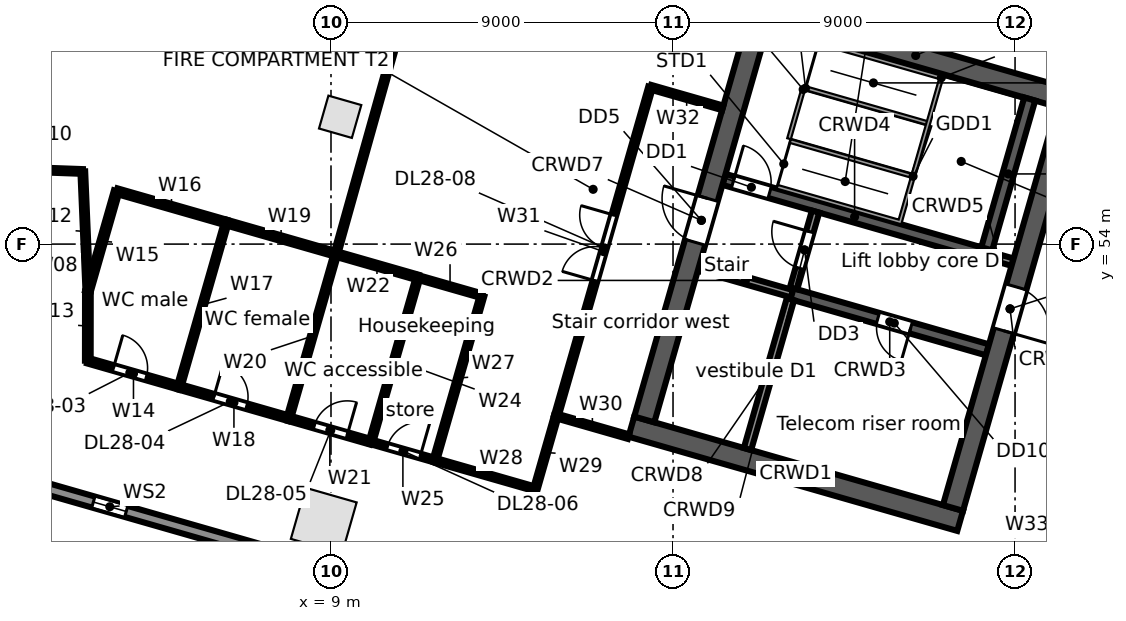
"""IFC4 building model, lengths in metres.
Left out: names, types, materials, properties, quantities, classifications, styles, units other than length and angle.
Written with IfcOpenShell. Run it as: python <this file> out.ifc"""

import sys

from ifc_helpers import new_model, si_unit, direction, frame, frame_2d, origin, origin_2d, place, context, subcontext, project, spatial, rectangle, extrude, element, fill, save


model = new_model("IFC4")
c1 = context("Model", 3, precision=1e-05, world=origin(), true_north=direction((0.0, 1.0)))
c2 = subcontext(c1, "Body", "Model", "MODEL_VIEW")
j1 = project(units=[si_unit("LENGTHUNIT", "METRE"), si_unit("PLANEANGLEUNIT", "RADIAN")], contexts=[c1])
p1 = place(None, origin())
s1 = spatial("IfcSite", under=j1, at=p1, CompositionType="ELEMENT")
p2 = place(p1, origin())
s2 = spatial("IfcBuilding", under=s1, at=p2, CompositionType="ELEMENT")
p3 = place(p2, frame((0.0, 0.0, 136.7)))
s3 = spatial("IfcBuildingStorey", under=s2, at=p3, CompositionType="ELEMENT", Elevation=136.7)
p4 = place(p3, frame((8.81, 46.722, 0.0), z_axis=(0.0, 0.0, 1.0), x_axis=(0.961261695938, -0.275637355817, 0.0)))
e1 = element("IfcColumn", 1, at=p4, inside=s3, PredefinedType="COLUMN", context=c2, shape_type="SweptSolid", body=[
    extrude(rectangle(XDim=1.4, YDim=1.4, at=origin_2d()), origin(), (0.0, 0.0, 1.0), 4.4),
])
p5 = place(p3, frame((9.241, 57.35, 0.0), z_axis=(0.0, 0.0, 1.0), x_axis=(0.961261695938, -0.275637355817, 0.0)))
e2 = element("IfcColumn", 2, at=p5, inside=s3, PredefinedType="COLUMN", context=c2, shape_type="SweptSolid", body=[
    extrude(rectangle(XDim=0.9, YDim=0.9, at=origin_2d()), origin(), (0.0, 0.0, 1.0), 4.4),
])
p6 = place(p3, frame((25.398, 40.717, 0.0), z_axis=(0.0, 0.0, 1.0), x_axis=(-0.961262423262, 0.275634819324, 0.0)))
e3 = element("IfcWall", 3, at=p6, inside=s3, PredefinedType="STANDARD", context=c2, shape_type="SweptSolid", body=[
    extrude(rectangle(XDim=26.359, YDim=0.3, at=frame_2d((13.179, 0.0))), origin(), (0.0, 0.0, 1.0), 4.08),
])
p7 = place(p6, frame((22.664, 0.0, 0.6)))
e4 = element("IfcOpeningElement", 4, at=p7, cuts=e3, PredefinedType="OPENING", context=c2, shape_type="SweptSolid", body=[
    extrude(rectangle(XDim=0.9, YDim=2.8, at=frame_2d((0.45, 1.4))), frame((0.0, 0.16, 0.0), z_axis=(0.0, -1.0, 0.0), x_axis=(1.0, 0.0, 0.0)), (0.0, 0.0, 1.0), 0.32),
])
p8 = place(p6, frame((13.844, 0.0, 0.6)))
e5 = element("IfcOpeningElement", 5, at=p8, cuts=e3, PredefinedType="OPENING", context=c2, shape_type="SweptSolid", body=[
    extrude(rectangle(XDim=0.9, YDim=2.8, at=frame_2d((0.45, 1.4))), frame((0.0, 0.16, 0.0), z_axis=(0.0, -1.0, 0.0), x_axis=(1.0, 0.0, 0.0)), (0.0, 0.0, 1.0), 0.32),
])
p9 = place(p6, frame((5.023, 0.0, 0.6)))
e6 = element("IfcOpeningElement", 6, at=p9, cuts=e3, PredefinedType="OPENING", context=c2, shape_type="SweptSolid", body=[
    extrude(rectangle(XDim=0.9, YDim=2.8, at=frame_2d((0.45, 1.4))), frame((0.0, 0.16, 0.0), z_axis=(0.0, -1.0, 0.0), x_axis=(1.0, 0.0, 0.0)), (0.0, 0.0, 1.0), 0.32),
])
p10 = place(p3, frame((16.904, 49.197, 0.0), z_axis=(0.0, 0.0, 1.0), x_axis=(0.96126248289, -0.275634611374, 0.0)))
e7 = element("IfcWall", 7, at=p10, inside=s3, PredefinedType="SOLIDWALL", context=c2, shape_type="SweptSolid", body=[
    extrude(rectangle(XDim=9.0, YDim=0.55, at=frame_2d((4.5, 0.0))), origin(), (0.0, 0.0, 1.0), 4.08),
])
p11 = place(p3, frame((18.68, 53.396, 0.0), z_axis=(0.0, 0.0, 1.0), x_axis=(0.961234387647, -0.275732573349, 0.0)))
e8 = element("IfcWall", 8, at=p11, inside=s3, PredefinedType="SOLIDWALL", context=c2, shape_type="SweptSolid", body=[
    extrude(rectangle(XDim=2.55, YDim=0.2, at=frame_2d((1.275, 0.0))), origin(), (0.0, 0.0, 1.0), 4.08),
])
p12 = place(p3, frame((21.131, 52.692, 0.0), z_axis=(0.0, 0.0, 1.0), x_axis=(0.961265220997, -0.27562506218, 0.0)))
e9 = element("IfcWall", 9, at=p12, inside=s3, PredefinedType="SOLIDWALL", context=c2, shape_type="SweptSolid", body=[
    extrude(rectangle(XDim=5.35, YDim=0.3, at=frame_2d((2.675, 0.0))), origin(), (0.0, 0.0, 1.0), 4.08),
])
p13 = place(p12, frame((2.35, 0.0, 0.0)))
e10 = element("IfcOpeningElement", 10, at=p13, cuts=e9, PredefinedType="OPENING", context=c2, shape_type="SweptSolid", body=[
    extrude(rectangle(XDim=0.9, YDim=2.1, at=frame_2d((0.45, 1.05))), frame((0.0, 0.16, 0.0), z_axis=(0.0, -1.0, 0.0), x_axis=(1.0, 0.0, 0.0)), (0.0, 0.0, 1.0), 0.32),
])
p14 = place(p3, frame((19.341, 55.702, 0.0), z_axis=(0.0, 0.0, 1.0), x_axis=(0.961263228157, -0.27563201228, 0.0)))
e11 = element("IfcWall", 11, at=p14, inside=s3, PredefinedType="SOLIDWALL", context=c2, shape_type="SweptSolid", body=[
    extrude(rectangle(XDim=7.15, YDim=0.3, at=frame_2d((3.575, 0.0))), origin(), (0.0, 0.0, 1.0), 4.08),
])
p15 = place(p14, frame((0.25, 0.0, 0.0)))
e12 = element("IfcOpeningElement", 12, at=p15, cuts=e11, PredefinedType="OPENING", context=c2, shape_type="SweptSolid", body=[
    extrude(rectangle(XDim=1.0, YDim=2.1, at=frame_2d((0.5, 1.05))), frame((0.0, 0.16, 0.0), z_axis=(0.0, -1.0, 0.0), x_axis=(1.0, 0.0, 0.0)), (0.0, 0.0, 1.0), 0.32),
])
p16 = place(p3, frame((26.214, 53.732, 0.0), z_axis=(0.0, 0.0, 1.0), x_axis=(0.961240918172, -0.275709806194, 0.0)))
e13 = element("IfcWall", 13, at=p16, inside=s3, PredefinedType="SOLIDWALL", context=c2, shape_type="SweptSolid", body=[
    extrude(rectangle(XDim=0.75, YDim=0.2, at=frame_2d((0.375, 0.0))), origin(), (0.0, 0.0, 1.0), 4.08),
])
p17 = place(p3, frame((20.06, 60.204, 0.0), z_axis=(0.0, 0.0, 1.0), x_axis=(0.96126248289, -0.275634611374, 0.0)))
e14 = element("IfcWall", 14, at=p17, inside=s3, PredefinedType="SOLIDWALL", context=c2, shape_type="SweptSolid", body=[
    extrude(rectangle(XDim=9.0, YDim=0.55, at=frame_2d((4.5, 0.0))), origin(), (0.0, 0.0, 1.0), 4.08),
])
p18 = place(p3, frame((17.244, 49.386, 0.0), z_axis=(0.0, 0.0, 1.0), x_axis=(0.275632146085, 0.96126318979, 0.0)))
e15 = element("IfcWall", 15, at=p18, inside=s3, PredefinedType="SOLIDWALL", context=c2, shape_type="SweptSolid", body=[
    extrude(rectangle(XDim=10.9, YDim=0.55, at=frame_2d((5.45, 0.0))), origin(), (0.0, 0.0, 1.0), 4.08),
])
p19 = place(p18, frame((4.85, 0.0, 0.0)))
e16 = element("IfcOpeningElement", 16, at=p19, cuts=e15, PredefinedType="OPENING", context=c2, shape_type="SweptSolid", body=[
    extrude(rectangle(XDim=1.2, YDim=2.1, at=frame_2d((0.6, 1.05))), frame((0.0, 0.285, 0.0), z_axis=(0.0, -1.0, 0.0), x_axis=(1.0, 0.0, 0.0)), (0.0, 0.0, 1.0), 0.57),
])
p20 = place(p3, frame((19.959, 48.607, 0.0), z_axis=(0.0, 0.0, 1.0), x_axis=(0.275641165445, 0.961260603537, 0.0)))
e17 = element("IfcWall", 17, at=p20, inside=s3, PredefinedType="SOLIDWALL", context=c2, shape_type="SweptSolid", body=[
    extrude(rectangle(XDim=4.1, YDim=0.2, at=frame_2d((2.05, 0.0))), origin(), (0.0, 0.0, 1.0), 4.08),
])
p21 = place(p3, frame((21.172, 52.837, 0.0), z_axis=(0.0, 0.0, 1.0), x_axis=(0.275657676022, 0.961255868981, 0.0)))
e18 = element("IfcWall", 18, at=p21, inside=s3, PredefinedType="PARTITIONING", context=c2, shape_type="SweptSolid", body=[
    extrude(rectangle(XDim=2.1, YDim=0.2, at=frame_2d((1.05, 0.0))), origin(), (0.0, 0.0, 1.0), 4.08),
])
p22 = place(p21, frame((0.55, 0.0, 0.0)))
e19 = element("IfcOpeningElement", 19, at=p22, cuts=e18, PredefinedType="OPENING", context=c2, shape_type="SweptSolid", body=[
    extrude(rectangle(XDim=1.0, YDim=2.1, at=frame_2d((0.5, 1.05))), frame((0.0, 0.11, 0.0), z_axis=(0.0, -1.0, 0.0), x_axis=(1.0, 0.0, 0.0)), (0.0, 0.0, 1.0), 0.22),
])
p23 = place(p3, frame((26.256, 53.876, 0.0), z_axis=(0.0, 0.0, 1.0), x_axis=(0.275641165445, 0.961260603537, 0.0)))
e20 = element("IfcWall", 20, at=p23, inside=s3, PredefinedType="SOLIDWALL", context=c2, shape_type="SweptSolid", body=[
    extrude(rectangle(XDim=4.1, YDim=0.3, at=frame_2d((2.05, 0.0))), origin(), (0.0, 0.0, 1.0), 4.08),
])
p24 = place(p3, frame((25.366, 47.057, 0.0), z_axis=(0.0, 0.0, 1.0), x_axis=(0.275632146085, 0.96126318979, 0.0)))
e21 = element("IfcWall", 21, at=p24, inside=s3, PredefinedType="SOLIDWALL", context=c2, shape_type="SweptSolid", body=[
    extrude(rectangle(XDim=10.9, YDim=0.55, at=frame_2d((5.45, 0.0))), origin(), (0.0, 0.0, 1.0), 4.08),
])
p25 = place(p24, frame((4.85, 0.0, 0.0)))
e22 = element("IfcOpeningElement", 22, at=p25, cuts=e21, PredefinedType="OPENING", context=c2, shape_type="SweptSolid", body=[
    extrude(rectangle(XDim=1.2, YDim=2.1, at=frame_2d((0.6, 1.05))), frame((0.0, 0.285, 0.0), z_axis=(0.0, -1.0, 0.0), x_axis=(1.0, 0.0, 0.0)), (0.0, 0.0, 1.0), 0.57),
])
p26 = place(p3, frame((0.0, 56.0, 0.0), z_axis=(0.0, 0.0, 1.0), x_axis=(0.999349313684, -0.036068673934, 0.0)))
e23 = element("IfcWall", 23, at=p26, inside=s3, PredefinedType="PARTITIONING", context=c2, shape_type="SweptSolid", body=[
    extrude(rectangle(XDim=2.471, YDim=0.125, at=frame_2d((1.235, 0.0))), origin(), (0.0, 0.0, 1.0), 4.08),
])
p27 = place(p26, frame((0.7, 0.0, 0.0)))
e24 = element("IfcOpeningElement", 24, at=p27, cuts=e23, PredefinedType="OPENING", context=c2, shape_type="SweptSolid", body=[
    extrude(rectangle(XDim=0.9, YDim=2.1, at=frame_2d((0.45, 1.05))), frame((0.0, 0.073, 0.0), z_axis=(0.0, -1.0, 0.0), x_axis=(1.0, 0.0, 0.0)), (0.0, 0.0, 1.0), 0.145),
])
p28 = place(p3, frame((2.469, 55.911, 0.0), z_axis=(0.0, 0.0, 1.0), x_axis=(0.042391721597, -0.99910106693, 0.0)))
e25 = element("IfcWall", 25, at=p28, inside=s3, PredefinedType="PARTITIONING", context=c2, shape_type="SweptSolid", body=[
    extrude(rectangle(XDim=3.162, YDim=0.125, at=frame_2d((1.581, 0.0))), origin(), (0.0, 0.0, 1.0), 4.08),
])
p29 = place(p3, frame((2.601, 50.932, 0.0), z_axis=(0.0, 0.0, 1.0), x_axis=(0.001073104681, 0.999999424223, 0.0)))
e26 = element("IfcWall", 26, at=p29, inside=s3, PredefinedType="PARTITIONING", context=c2, shape_type="SweptSolid", body=[
    extrude(rectangle(XDim=1.82, YDim=0.15, at=frame_2d((0.91, 0.0))), origin(), (0.0, 0.0, 1.0), 4.08),
])
p30 = place(p3, frame((2.601, 50.932, 0.0), z_axis=(0.0, 0.0, 1.0), x_axis=(0.961265528111, -0.275623991092, 0.0)))
e27 = element("IfcWall", 27, at=p30, inside=s3, PredefinedType="PARTITIONING", context=c2, shape_type="SweptSolid", body=[
    extrude(rectangle(XDim=2.5, YDim=0.15, at=frame_2d((1.25, 0.0))), origin(), (0.0, 0.0, 1.0), 4.08),
])
p31 = place(p30, frame((0.7, 0.0, 0.0)))
e28 = element("IfcOpeningElement", 28, at=p31, cuts=e27, PredefinedType="OPENING", context=c2, shape_type="SweptSolid", body=[
    extrude(rectangle(XDim=0.9, YDim=2.1, at=frame_2d((0.45, 1.05))), frame((0.0, 0.085, 0.0), z_axis=(0.0, -1.0, 0.0), x_axis=(1.0, 0.0, 0.0)), (0.0, 0.0, 1.0), 0.17),
])
p32 = place(p3, frame((2.603, 52.752, 0.0), z_axis=(0.0, 0.0, 1.0), x_axis=(0.27569433145, 0.961245356611, 0.0)))
e29 = element("IfcWall", 29, at=p32, inside=s3, PredefinedType="PARTITIONING", context=c2, shape_type="SweptSolid", body=[
    extrude(rectangle(XDim=2.75, YDim=0.15, at=frame_2d((1.375, 0.0))), origin(), (0.0, 0.0, 1.0), 4.08),
])
p33 = place(p3, frame((3.361, 55.395, 0.0), z_axis=(0.0, 0.0, 1.0), x_axis=(0.961268664977, -0.27561305073, 0.0)))
e30 = element("IfcWall", 30, at=p33, inside=s3, PredefinedType="PARTITIONING", context=c2, shape_type="SweptSolid", body=[
    extrude(rectangle(XDim=3.0, YDim=0.15, at=frame_2d((1.5, 0.0))), origin(), (0.0, 0.0, 1.0), 4.08),
])
p34 = place(p3, frame((5.004, 50.243, 0.0), z_axis=(0.0, 0.0, 1.0), x_axis=(0.275838825927, 0.961203902464, 0.0)))
e31 = element("IfcWall", 31, at=p34, inside=s3, PredefinedType="PARTITIONING", context=c2, shape_type="SweptSolid", body=[
    extrude(rectangle(XDim=4.5, YDim=0.125, at=frame_2d((2.25, 0.0))), origin(), (0.0, 0.0, 1.0), 4.08),
])
p35 = place(p3, frame((5.004, 50.243, 0.0), z_axis=(0.0, 0.0, 1.0), x_axis=(0.961268664977, -0.27561305073, 0.0)))
e32 = element("IfcWall", 32, at=p35, inside=s3, PredefinedType="PARTITIONING", context=c2, shape_type="SweptSolid", body=[
    extrude(rectangle(XDim=3.0, YDim=0.15, at=frame_2d((1.5, 0.0))), origin(), (0.0, 0.0, 1.0), 4.08),
])
p36 = place(p35, frame((0.95, 0.0, 0.0)))
e33 = element("IfcOpeningElement", 33, at=p36, cuts=e32, PredefinedType="OPENING", context=c2, shape_type="SweptSolid", body=[
    extrude(rectangle(XDim=0.9, YDim=2.1, at=frame_2d((0.45, 1.05))), frame((0.0, 0.085, 0.0), z_axis=(0.0, -1.0, 0.0), x_axis=(1.0, 0.0, 0.0)), (0.0, 0.0, 1.0), 0.17),
])
p37 = place(p3, frame((6.245, 54.568, 0.0), z_axis=(0.0, 0.0, 1.0), x_axis=(0.961240918172, -0.275709806194, 0.0)))
e34 = element("IfcWall", 34, at=p37, inside=s3, PredefinedType="PARTITIONING", context=c2, shape_type="SweptSolid", body=[
    extrude(rectangle(XDim=3.0, YDim=0.15, at=frame_2d((1.5, 0.0))), origin(), (0.0, 0.0, 1.0), 3.16),
])
p38 = place(p3, frame((7.888, 49.416, 0.0), z_axis=(0.0, 0.0, 1.0), x_axis=(0.275803080638, 0.96121415965, 0.0)))
e35 = element("IfcWall", 35, at=p38, inside=s3, PredefinedType="PARTITIONING", context=c2, shape_type="SweptSolid", body=[
    extrude(rectangle(XDim=4.5, YDim=0.125, at=frame_2d((2.25, 0.0))), origin(), (0.0, 0.0, 1.0), 3.16),
])
p39 = place(p3, frame((7.888, 49.416, 0.0), z_axis=(0.0, 0.0, 1.0), x_axis=(0.9611628742, -0.275981755301, 0.0)))
e36 = element("IfcWall", 36, at=p39, inside=s3, PredefinedType="PARTITIONING", context=c2, shape_type="SweptSolid", body=[
    extrude(rectangle(XDim=2.25, YDim=0.15, at=frame_2d((1.125, 0.0))), origin(), (0.0, 0.0, 1.0), 3.142),
])
p40 = place(p39, frame((0.7, 0.0, 0.0)))
e37 = element("IfcOpeningElement", 37, at=p40, cuts=e36, PredefinedType="OPENING", context=c2, shape_type="SweptSolid", body=[
    extrude(rectangle(XDim=0.9, YDim=2.1, at=frame_2d((0.45, 1.05))), frame((0.0, 0.085, 0.0), z_axis=(0.0, -1.0, 0.0), x_axis=(1.0, 0.0, 0.0)), (0.0, 0.0, 1.0), 0.17),
])
p41 = place(p3, frame((9.129, 53.741, 0.0), z_axis=(0.0, 0.0, 1.0), x_axis=(0.961273691875, -0.275595517578, 0.0)))
e38 = element("IfcWall", 38, at=p41, inside=s3, PredefinedType="PARTITIONING", context=c2, shape_type="SweptSolid", body=[
    extrude(rectangle(XDim=2.249, YDim=0.15, at=frame_2d((1.125, 0.0))), origin(), (0.0, 0.0, 1.0), 3.142),
])
p42 = place(p3, frame((9.129, 53.741, 0.0), z_axis=(0.0, 0.0, 1.0), x_axis=(0.269791738843, 0.962918697322, 0.0)))
e39 = element("IfcWall", 39, at=p42, inside=s3, PredefinedType="PARTITIONING", context=c2, shape_type="SweptSolid", body=[
    extrude(rectangle(XDim=14.886, YDim=0.125, at=frame_2d((7.443, 0.0))), origin(), (0.0, 0.0, 1.0), 3.142),
])
p43 = place(p3, frame((10.051, 48.795, 0.0), z_axis=(0.0, 0.0, 1.0), x_axis=(0.275530671241, 0.961292280841, 0.0)))
e40 = element("IfcWall", 40, at=p43, inside=s3, PredefinedType="PARTITIONING", context=c2, shape_type="SweptSolid", body=[
    extrude(rectangle(XDim=4.5, YDim=0.125, at=frame_2d((2.25, 0.0))), origin(), (0.0, 0.0, 1.0), 4.08),
])
p44 = place(p3, frame((10.051, 48.795, 0.0), z_axis=(0.0, 0.0, 1.0), x_axis=(0.961313033798, -0.275458256455, 0.0)))
e41 = element("IfcWall", 41, at=p44, inside=s3, PredefinedType="PARTITIONING", context=c2, shape_type="SweptSolid", body=[
    extrude(rectangle(XDim=1.75, YDim=0.125, at=frame_2d((0.875, 0.0))), origin(), (0.0, 0.0, 1.0), 4.08),
])
p45 = place(p44, frame((0.45, 0.0, 0.0)))
e42 = element("IfcOpeningElement", 42, at=p45, cuts=e41, PredefinedType="OPENING", context=c2, shape_type="SweptSolid", body=[
    extrude(rectangle(XDim=0.9, YDim=2.1, at=frame_2d((0.45, 1.05))), frame((0.0, 0.073, 0.0), z_axis=(0.0, -1.0, 0.0), x_axis=(1.0, 0.0, 0.0)), (0.0, 0.0, 1.0), 0.145),
])
p46 = place(p3, frame((11.291, 53.121, 0.0), z_axis=(0.0, 0.0, 1.0), x_axis=(0.961329010357, -0.275402494264, 0.0)))
e43 = element("IfcWall", 43, at=p46, inside=s3, PredefinedType="PARTITIONING", context=c2, shape_type="SweptSolid", body=[
    extrude(rectangle(XDim=1.751, YDim=0.125, at=frame_2d((0.875, 0.0))), origin(), (0.0, 0.0, 1.0), 4.08),
])
p47 = place(p3, frame((11.733, 48.313, 0.0), z_axis=(0.0, 0.0, 1.0), x_axis=(0.275795676316, 0.961216284155, 0.0)))
e44 = element("IfcWall", 44, at=p47, inside=s3, PredefinedType="PARTITIONING", context=c2, shape_type="SweptSolid", body=[
    extrude(rectangle(XDim=4.5, YDim=0.125, at=frame_2d((2.25, 0.0))), origin(), (0.0, 0.0, 1.0), 4.08),
])
p48 = place(p3, frame((11.733, 48.313, 0.0), z_axis=(0.0, 0.0, 1.0), x_axis=(0.961272337704, -0.275600240865, 0.0)))
e45 = element("IfcWall", 45, at=p48, inside=s3, PredefinedType="PARTITIONING", context=c2, shape_type="SweptSolid", body=[
    extrude(rectangle(XDim=2.75, YDim=0.125, at=frame_2d((1.375, 0.0))), origin(), (0.0, 0.0, 1.0), 4.08),
])
p49 = place(p3, frame((14.377, 47.555, 0.0), z_axis=(0.0, 0.0, 1.0), x_axis=(0.275446387355, 0.961316434736, 0.0)))
e46 = element("IfcWall", 46, at=p49, inside=s3, PredefinedType="PARTITIONING", context=c2, shape_type="SweptSolid", body=[
    extrude(rectangle(XDim=2.0, YDim=0.125, at=frame_2d((1.0, 0.0))), origin(), (0.0, 0.0, 1.0), 4.08),
])
p50 = place(p3, frame((14.928, 49.478, 0.0), z_axis=(0.0, 0.0, 1.0), x_axis=(0.961243778232, -0.27569983462, 0.0)))
e47 = element("IfcWall", 47, at=p50, inside=s3, PredefinedType="PARTITIONING", context=c2, shape_type="SweptSolid", body=[
    extrude(rectangle(XDim=1.977, YDim=0.125, at=frame_2d((0.988, 0.0))), origin(), (0.0, 0.0, 1.0), 4.08),
])
p51 = place(p3, frame((14.928, 49.478, 0.0), z_axis=(0.0, 0.0, 1.0), x_axis=(0.275674053528, 0.961251172281, 0.0)))
e48 = element("IfcWall", 48, at=p51, inside=s3, PredefinedType="PARTITIONING", context=c2, shape_type="SweptSolid", body=[
    extrude(rectangle(XDim=9.0, YDim=0.125, at=frame_2d((4.5, 0.0))), origin(), (0.0, 0.0, 1.0), 3.142),
])
p52 = place(p51, frame((3.7, 0.0, 0.0)))
e49 = element("IfcOpeningElement", 49, at=p52, cuts=e48, PredefinedType="OPENING", context=c2, shape_type="SweptSolid", body=[
    extrude(rectangle(XDim=1.8, YDim=2.1, at=frame_2d((0.9, 1.05))), frame((0.0, 0.073, 0.0), z_axis=(0.0, -1.0, 0.0), x_axis=(1.0, 0.0, 0.0)), (0.0, 0.0, 1.0), 0.145),
])
p53 = place(p3, frame((17.409, 58.129, 0.0), z_axis=(0.0, 0.0, 1.0), x_axis=(0.961253165474, -0.275667103345, 0.0)))
e50 = element("IfcWall", 50, at=p53, inside=s3, PredefinedType="PARTITIONING", context=c2, shape_type="SweptSolid", body=[
    extrude(rectangle(XDim=1.977, YDim=0.125, at=frame_2d((0.988, 0.0))), origin(), (0.0, 0.0, 1.0), 4.08),
])
p54 = place(p3, frame((26.373, 42.206, 0.0), z_axis=(0.0, 0.0, 1.0), x_axis=(0.52987567935, 0.848075329457, 0.0)))
e51 = element("IfcWall", 51, at=p54, inside=s3, PredefinedType="PARTITIONING", context=c2, shape_type="SweptSolid", body=[
    extrude(rectangle(XDim=6.232, YDim=0.25, at=frame_2d((3.116, 0.0))), origin(), (0.0, 0.0, 1.0), 4.08),
])
p55 = place(p54, frame((2.2, 0.0, 0.0)))
e52 = element("IfcOpeningElement", 52, at=p55, cuts=e51, PredefinedType="OPENING", context=c2, shape_type="SweptSolid", body=[
    extrude(rectangle(XDim=1.8, YDim=2.1, at=frame_2d((0.9, 1.05))), frame((0.0, 0.135, 0.0), z_axis=(0.0, -1.0, 0.0), x_axis=(1.0, 0.0, 0.0)), (0.0, 0.0, 1.0), 0.27),
])
p56 = place(p7, origin())
e53 = element("IfcWindow", 53, at=p56, inside=s3, PartitioningType="SINGLE_PANEL", PredefinedType="WINDOW", context=c2, shape_type="SweptSolid", body=[
    extrude(rectangle(XDim=0.9, YDim=2.8, at=frame_2d((0.45, 1.4))), frame((0.0, 0.03, 0.0), z_axis=(0.0, -1.0, 0.0), x_axis=(1.0, 0.0, 0.0)), (0.0, 0.0, 1.0), 0.06),
])
fill(e4, e53)
p57 = place(p15, origin())
e54 = element("IfcDoor", 54, at=p57, inside=s3, OperationType="SINGLE_SWING_LEFT", PredefinedType="DOOR", context=c2, shape_type="SweptSolid", body=[
    extrude(rectangle(XDim=1.0, YDim=2.1, at=frame_2d((0.5, 1.05))), frame((0.0, 0.025, 0.0), z_axis=(0.0, -1.0, 0.0), x_axis=(1.0, 0.0, 0.0)), (0.0, 0.0, 1.0), 0.05),
])
fill(e12, e54)
p58 = place(p22, origin())
e55 = element("IfcDoor", 55, at=p58, inside=s3, OperationType="SINGLE_SWING_RIGHT", PredefinedType="DOOR", context=c2, shape_type="SweptSolid", body=[
    extrude(rectangle(XDim=1.0, YDim=2.1, at=frame_2d((0.5, 1.05))), frame((0.0, 0.025, 0.0), z_axis=(0.0, -1.0, 0.0), x_axis=(1.0, 0.0, 0.0)), (0.0, 0.0, 1.0), 0.05),
])
fill(e19, e55)
p59 = place(p19, origin())
e56 = element("IfcDoor", 56, at=p59, inside=s3, OperationType="SINGLE_SWING_RIGHT", PredefinedType="DOOR", context=c2, shape_type="SweptSolid", body=[
    extrude(rectangle(XDim=1.2, YDim=2.1, at=frame_2d((0.6, 1.05))), frame((0.0, 0.025, 0.0), z_axis=(0.0, -1.0, 0.0), x_axis=(1.0, 0.0, 0.0)), (0.0, 0.0, 1.0), 0.05),
])
fill(e16, e56)
p60 = place(p25, frame((1.2, 0.0, 0.0), z_axis=(0.0, 0.0, 1.0), x_axis=(-1.0, 0.0, 0.0)))
e57 = element("IfcDoor", 57, at=p60, inside=s3, OperationType="SINGLE_SWING_RIGHT", PredefinedType="DOOR", context=c2, shape_type="SweptSolid", body=[
    extrude(rectangle(XDim=1.2, YDim=2.1, at=frame_2d((0.6, 1.05))), frame((0.0, 0.025, 0.0), z_axis=(0.0, -1.0, 0.0), x_axis=(1.0, 0.0, 0.0)), (0.0, 0.0, 1.0), 0.05),
])
fill(e22, e57)
p61 = place(p13, frame((0.9, 0.0, 0.0), z_axis=(0.0, 0.0, 1.0), x_axis=(-1.0, 0.0, 0.0)))
e58 = element("IfcDoor", 58, at=p61, inside=s3, OperationType="SINGLE_SWING_LEFT", PredefinedType="DOOR", context=c2, shape_type="SweptSolid", body=[
    extrude(rectangle(XDim=0.9, YDim=2.1, at=frame_2d((0.45, 1.05))), frame((0.0, 0.025, 0.0), z_axis=(0.0, -1.0, 0.0), x_axis=(1.0, 0.0, 0.0)), (0.0, 0.0, 1.0), 0.05),
])
fill(e10, e58)
p62 = place(p31, origin())
e59 = element("IfcDoor", 59, at=p62, inside=s3, OperationType="SINGLE_SWING_LEFT", PredefinedType="DOOR", context=c2, shape_type="SweptSolid", body=[
    extrude(rectangle(XDim=0.9, YDim=2.1, at=frame_2d((0.45, 1.05))), frame((0.0, 0.025, 0.0), z_axis=(0.0, -1.0, 0.0), x_axis=(1.0, 0.0, 0.0)), (0.0, 0.0, 1.0), 0.05),
])
fill(e28, e59)
p63 = place(p36, origin())
e60 = element("IfcDoor", 60, at=p63, inside=s3, OperationType="SINGLE_SWING_LEFT", PredefinedType="DOOR", context=c2, shape_type="SweptSolid", body=[
    extrude(rectangle(XDim=0.9, YDim=2.1, at=frame_2d((0.45, 1.05))), frame((0.0, 0.025, 0.0), z_axis=(0.0, -1.0, 0.0), x_axis=(1.0, 0.0, 0.0)), (0.0, 0.0, 1.0), 0.05),
])
fill(e33, e60)
p64 = place(p40, origin())
e61 = element("IfcDoor", 61, at=p64, inside=s3, OperationType="SINGLE_SWING_RIGHT", PredefinedType="DOOR", context=c2, shape_type="SweptSolid", body=[
    extrude(rectangle(XDim=0.9, YDim=2.1, at=frame_2d((0.45, 1.05))), frame((0.0, 0.025, 0.0), z_axis=(0.0, -1.0, 0.0), x_axis=(1.0, 0.0, 0.0)), (0.0, 0.0, 1.0), 0.05),
])
fill(e37, e61)
p65 = place(p45, origin())
e62 = element("IfcDoor", 62, at=p65, inside=s3, OperationType="SINGLE_SWING_RIGHT", PredefinedType="DOOR", context=c2, shape_type="SweptSolid", body=[
    extrude(rectangle(XDim=0.9, YDim=2.1, at=frame_2d((0.45, 1.05))), frame((0.0, 0.025, 0.0), z_axis=(0.0, -1.0, 0.0), x_axis=(1.0, 0.0, 0.0)), (0.0, 0.0, 1.0), 0.05),
])
fill(e42, e62)
p66 = place(p52, origin())
e63 = element("IfcDoor", 63, at=p66, inside=s3, OperationType="DOUBLE_DOOR_SINGLE_SWING", PredefinedType="DOOR", context=c2, shape_type="SweptSolid", body=[
    extrude(rectangle(XDim=1.8, YDim=2.1, at=frame_2d((0.9, 1.05))), frame((0.0, 0.025, 0.0), z_axis=(0.0, -1.0, 0.0), x_axis=(1.0, 0.0, 0.0)), (0.0, 0.0, 1.0), 0.05),
])
fill(e49, e63)
save(model, sys.argv[1])
